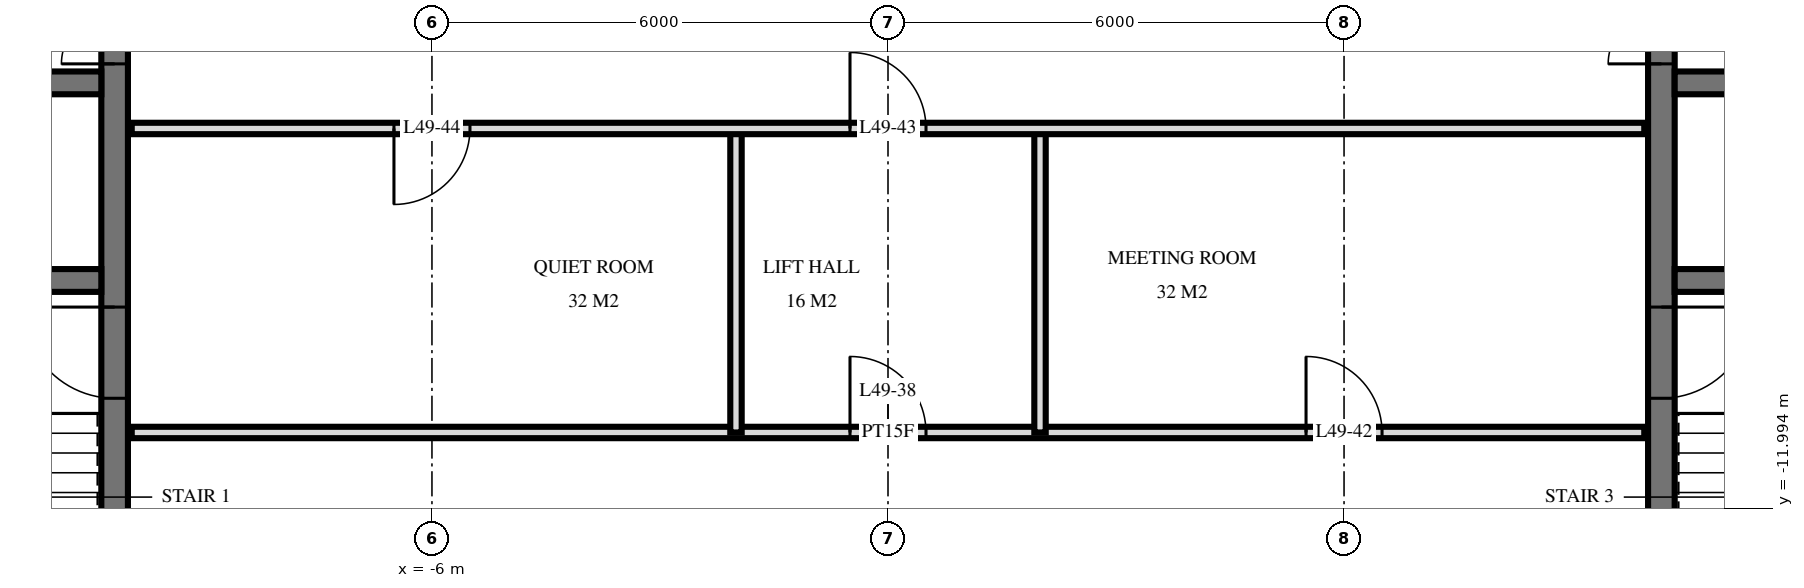
"""IFC4 building model, lengths in metres.
Left out: names, types, materials, properties, quantities, classifications, styles, units other than length and angle.
Written with IfcOpenShell. Run it as: python <this file> out.ifc"""

import sys

from ifc_helpers import new_model, si_unit, direction, frame, frame_2d, origin, place, context, subcontext, project, spatial, rectangle, extrude, element, fill, save


model = new_model("IFC4")
c1 = context("Model", 3, precision=1e-05, world=origin(), true_north=direction((0.0, 1.0)))
c2 = subcontext(c1, "Body", "Model", "MODEL_VIEW")
j1 = project(units=[si_unit("LENGTHUNIT", "METRE"), si_unit("PLANEANGLEUNIT", "RADIAN")], contexts=[c1])
p1 = place(None, origin())
s1 = spatial("IfcSite", under=j1, at=p1, CompositionType="ELEMENT")
p2 = place(p1, origin())
s2 = spatial("IfcBuilding", under=s1, at=p2, CompositionType="ELEMENT")
p3 = place(p2, frame((0.0, 0.0, 190.6)))
s3 = spatial("IfcBuildingStorey", under=s2, at=p3, CompositionType="ELEMENT", Elevation=190.6)
p4 = place(p3, frame((-10.175, -14.55, 0.0), z_axis=(0.0, 0.0, 1.0), x_axis=(0.0, 1.0, 0.0)))
e1 = element("IfcWall", 1, at=p4, inside=s3, PredefinedType="SHEAR", context=c2, shape_type="SweptSolid", body=[
    extrude(rectangle(XDim=14.1, YDim=0.35, at=frame_2d((7.05, 0.0))), origin(), (0.0, 0.0, 1.0), 3.5),
])
p5 = place(p4, frame((8.4, 0.0, 0.0)))
e2 = element("IfcOpeningElement", 2, at=p5, cuts=e1, PredefinedType="OPENING", context=c2, shape_type="SweptSolid", body=[
    extrude(rectangle(XDim=1.4, YDim=2.4, at=frame_2d((0.7, 1.2))), frame((0.0, 0.185, 0.0), z_axis=(0.0, -1.0, 0.0), x_axis=(1.0, 0.0, 0.0)), (0.0, 0.0, 1.0), 0.37),
])
p6 = place(p4, frame((10.0, 0.0, 0.0)))
e3 = element("IfcOpeningElement", 3, at=p6, cuts=e1, PredefinedType="OPENING", context=c2, shape_type="SweptSolid", body=[
    extrude(rectangle(XDim=1.4, YDim=2.4, at=frame_2d((0.7, 1.2))), frame((0.0, 0.185, 0.0), z_axis=(0.0, -1.0, 0.0), x_axis=(1.0, 0.0, 0.0)), (0.0, 0.0, 1.0), 0.37),
])
p7 = place(p4, frame((4.0, 0.0, 0.0)))
e4 = element("IfcOpeningElement", 4, at=p7, cuts=e1, PredefinedType="OPENING", context=c2, shape_type="SweptSolid", body=[
    extrude(rectangle(XDim=1.2, YDim=2.1, at=frame_2d((0.6, 1.05))), frame((0.0, 0.185, 0.0), z_axis=(0.0, -1.0, 0.0), x_axis=(1.0, 0.0, 0.0)), (0.0, 0.0, 1.0), 0.37),
])
p8 = place(p3, frame((-24.05, -6.4, 0.0), z_axis=(0.0, 0.0, 1.0), x_axis=(1.0, 0.0, 0.0)))
e5 = element("IfcWall", 5, at=p8, inside=s3, PredefinedType="SHEAR", context=c2, shape_type="SweptSolid", body=[
    extrude(rectangle(XDim=13.7, YDim=0.3, at=frame_2d((6.85, 0.0))), origin(), (0.0, 0.0, 1.0), 3.5),
])
p9 = place(p8, frame((0.55, 0.0, 0.0)))
e6 = element("IfcOpeningElement", 6, at=p9, cuts=e5, PredefinedType="OPENING", context=c2, shape_type="SweptSolid", body=[
    extrude(rectangle(XDim=1.1, YDim=2.1, at=frame_2d((0.55, 1.05))), frame((0.0, 0.16, 0.0), z_axis=(0.0, -1.0, 0.0), x_axis=(1.0, 0.0, 0.0)), (0.0, 0.0, 1.0), 0.32),
])
p10 = place(p8, frame((5.8, 0.0, 0.0)))
e7 = element("IfcOpeningElement", 7, at=p10, cuts=e5, PredefinedType="OPENING", context=c2, shape_type="SweptSolid", body=[
    extrude(rectangle(XDim=1.1, YDim=2.1, at=frame_2d((0.55, 1.05))), frame((0.0, 0.16, 0.0), z_axis=(0.0, -1.0, 0.0), x_axis=(1.0, 0.0, 0.0)), (0.0, 0.0, 1.0), 0.32),
])
p11 = place(p3, frame((-24.05, -9.0, 0.0), z_axis=(0.0, 0.0, 1.0), x_axis=(1.0, 0.0, 0.0)))
e8 = element("IfcWall", 8, at=p11, inside=s3, PredefinedType="SHEAR", context=c2, shape_type="SweptSolid", body=[
    extrude(rectangle(XDim=13.7, YDim=0.3, at=frame_2d((6.85, 0.0))), origin(), (0.0, 0.0, 1.0), 3.5),
])
p12 = place(p11, frame((8.8, 0.0, 0.0)))
e9 = element("IfcOpeningElement", 9, at=p12, cuts=e8, PredefinedType="OPENING", context=c2, shape_type="SweptSolid", body=[
    extrude(rectangle(XDim=1.1, YDim=2.1, at=frame_2d((0.55, 1.05))), frame((0.0, 0.16, 0.0), z_axis=(0.0, -1.0, 0.0), x_axis=(1.0, 0.0, 0.0)), (0.0, 0.0, 1.0), 0.32),
])
p13 = place(p3, frame((10.175, -14.55, 0.0), z_axis=(0.0, 0.0, 1.0), x_axis=(0.0, 1.0, 0.0)))
e10 = element("IfcWall", 10, at=p13, inside=s3, PredefinedType="SHEAR", context=c2, shape_type="SweptSolid", body=[
    extrude(rectangle(XDim=14.1, YDim=0.35, at=frame_2d((7.05, 0.0))), origin(), (0.0, 0.0, 1.0), 3.5),
])
p14 = place(p13, frame((8.4, 0.0, 0.0)))
e11 = element("IfcOpeningElement", 11, at=p14, cuts=e10, PredefinedType="OPENING", context=c2, shape_type="SweptSolid", body=[
    extrude(rectangle(XDim=1.4, YDim=2.4, at=frame_2d((0.7, 1.2))), frame((0.0, 0.185, 0.0), z_axis=(0.0, -1.0, 0.0), x_axis=(1.0, 0.0, 0.0)), (0.0, 0.0, 1.0), 0.37),
])
p15 = place(p13, frame((10.0, 0.0, 0.0)))
e12 = element("IfcOpeningElement", 12, at=p15, cuts=e10, PredefinedType="OPENING", context=c2, shape_type="SweptSolid", body=[
    extrude(rectangle(XDim=1.4, YDim=2.4, at=frame_2d((0.7, 1.2))), frame((0.0, 0.185, 0.0), z_axis=(0.0, -1.0, 0.0), x_axis=(1.0, 0.0, 0.0)), (0.0, 0.0, 1.0), 0.37),
])
p16 = place(p13, frame((4.0, 0.0, 0.0)))
e13 = element("IfcOpeningElement", 13, at=p16, cuts=e10, PredefinedType="OPENING", context=c2, shape_type="SweptSolid", body=[
    extrude(rectangle(XDim=1.2, YDim=2.1, at=frame_2d((0.6, 1.05))), frame((0.0, 0.185, 0.0), z_axis=(0.0, -1.0, 0.0), x_axis=(1.0, 0.0, 0.0)), (0.0, 0.0, 1.0), 0.37),
])
p17 = place(p3, frame((10.35, -6.4, 0.0), z_axis=(0.0, 0.0, 1.0), x_axis=(1.0, 0.0, 0.0)))
e14 = element("IfcWall", 14, at=p17, inside=s3, PredefinedType="SHEAR", context=c2, shape_type="SweptSolid", body=[
    extrude(rectangle(XDim=13.7, YDim=0.3, at=frame_2d((6.85, 0.0))), origin(), (0.0, 0.0, 1.0), 3.5),
])
p18 = place(p17, frame((12.05, 0.0, 0.0)))
e15 = element("IfcOpeningElement", 15, at=p18, cuts=e14, PredefinedType="OPENING", context=c2, shape_type="SweptSolid", body=[
    extrude(rectangle(XDim=1.1, YDim=2.1, at=frame_2d((0.55, 1.05))), frame((0.0, 0.16, 0.0), z_axis=(0.0, -1.0, 0.0), x_axis=(1.0, 0.0, 0.0)), (0.0, 0.0, 1.0), 0.32),
])
p19 = place(p17, frame((6.8, 0.0, 0.0)))
e16 = element("IfcOpeningElement", 16, at=p19, cuts=e14, PredefinedType="OPENING", context=c2, shape_type="SweptSolid", body=[
    extrude(rectangle(XDim=1.1, YDim=2.1, at=frame_2d((0.55, 1.05))), frame((0.0, 0.16, 0.0), z_axis=(0.0, -1.0, 0.0), x_axis=(1.0, 0.0, 0.0)), (0.0, 0.0, 1.0), 0.32),
])
p20 = place(p3, frame((10.35, -9.0, 0.0), z_axis=(0.0, 0.0, 1.0), x_axis=(1.0, 0.0, 0.0)))
e17 = element("IfcWall", 17, at=p20, inside=s3, PredefinedType="SHEAR", context=c2, shape_type="SweptSolid", body=[
    extrude(rectangle(XDim=13.7, YDim=0.3, at=frame_2d((6.85, 0.0))), origin(), (0.0, 0.0, 1.0), 3.5),
])
p21 = place(p20, frame((3.8, 0.0, 0.0)))
e18 = element("IfcOpeningElement", 18, at=p21, cuts=e17, PredefinedType="OPENING", context=c2, shape_type="SweptSolid", body=[
    extrude(rectangle(XDim=1.1, YDim=2.1, at=frame_2d((0.55, 1.05))), frame((0.0, 0.16, 0.0), z_axis=(0.0, -1.0, 0.0), x_axis=(1.0, 0.0, 0.0)), (0.0, 0.0, 1.0), 0.32),
])
for number, where, z_axis, x_axis in (
    (19, (2.0, -11.0, 0.0), (0.0, 0.0, 1.0), (0.0, 1.0, 0.0)),
    (20, (-2.0, -11.0, 0.0), (0.0, 0.0, 1.0), (0.0, 1.0, 0.0)),
):
    element("IfcWall", number, at=place(p3, frame(where, z_axis=z_axis, x_axis=x_axis)), inside=s3, PredefinedType="PARTITIONING", context=c2, shape_type="SweptSolid", body=[
        extrude(rectangle(XDim=4.0, YDim=0.15, at=frame_2d((2.0, 0.0))), origin(), (0.0, 0.0, 1.0), 3.22),
    ])
p22 = place(p3, frame((-9.95, -11.0, 0.0), z_axis=(0.0, 0.0, 1.0), x_axis=(1.0, 0.0, 0.0)))
e21 = element("IfcWall", 21, at=p22, inside=s3, PredefinedType="PARTITIONING", context=c2, shape_type="SweptSolid", body=[
    extrude(rectangle(XDim=19.9, YDim=0.15, at=frame_2d((9.95, 0.0))), origin(), (0.0, 0.0, 1.0), 3.22),
])
p23 = place(p22, frame((9.45, 0.0, 0.0)))
e22 = element("IfcOpeningElement", 22, at=p23, cuts=e21, PredefinedType="OPENING", context=c2, shape_type="SweptSolid", body=[
    extrude(rectangle(XDim=1.0, YDim=2.1, at=frame_2d((0.5, 1.05))), frame((0.0, 0.085, 0.0), z_axis=(0.0, -1.0, 0.0), x_axis=(1.0, 0.0, 0.0)), (0.0, 0.0, 1.0), 0.17),
])
p24 = place(p22, frame((15.45, 0.0, 0.0)))
e23 = element("IfcOpeningElement", 23, at=p24, cuts=e21, PredefinedType="OPENING", context=c2, shape_type="SweptSolid", body=[
    extrude(rectangle(XDim=1.0, YDim=2.1, at=frame_2d((0.5, 1.05))), frame((0.0, 0.085, 0.0), z_axis=(0.0, -1.0, 0.0), x_axis=(1.0, 0.0, 0.0)), (0.0, 0.0, 1.0), 0.17),
])
p25 = place(p3, frame((-9.95, -7.0, 0.0), z_axis=(0.0, 0.0, 1.0), x_axis=(1.0, 0.0, 0.0)))
e24 = element("IfcWall", 24, at=p25, inside=s3, PredefinedType="PARTITIONING", context=c2, shape_type="SweptSolid", body=[
    extrude(rectangle(XDim=19.9, YDim=0.15, at=frame_2d((9.95, 0.0))), origin(), (0.0, 0.0, 1.0), 3.22),
])
p26 = place(p25, frame((9.45, 0.0, 0.0)))
e25 = element("IfcOpeningElement", 25, at=p26, cuts=e24, PredefinedType="OPENING", context=c2, shape_type="SweptSolid", body=[
    extrude(rectangle(XDim=1.0, YDim=2.1, at=frame_2d((0.5, 1.05))), frame((0.0, 0.085, 0.0), z_axis=(0.0, -1.0, 0.0), x_axis=(1.0, 0.0, 0.0)), (0.0, 0.0, 1.0), 0.17),
])
p27 = place(p25, frame((3.45, 0.0, 0.0)))
e26 = element("IfcOpeningElement", 26, at=p27, cuts=e24, PredefinedType="OPENING", context=c2, shape_type="SweptSolid", body=[
    extrude(rectangle(XDim=1.0, YDim=2.1, at=frame_2d((0.5, 1.05))), frame((0.0, 0.085, 0.0), z_axis=(0.0, -1.0, 0.0), x_axis=(1.0, 0.0, 0.0)), (0.0, 0.0, 1.0), 0.17),
])
p28 = place(p5, origin())
e27 = element("IfcDoor", 27, at=p28, inside=s3, OperationType="DOUBLE_DOOR_SINGLE_SWING", PredefinedType="DOOR", context=c2, shape_type="SweptSolid", body=[
    extrude(rectangle(XDim=1.4, YDim=2.4, at=frame_2d((0.7, 1.2))), frame((0.0, 0.025, 0.0), z_axis=(0.0, -1.0, 0.0), x_axis=(1.0, 0.0, 0.0)), (0.0, 0.0, 1.0), 0.05),
])
fill(e2, e27)
p29 = place(p7, origin())
e28 = element("IfcDoor", 28, at=p29, inside=s3, OperationType="SINGLE_SWING_LEFT", PredefinedType="DOOR", context=c2, shape_type="SweptSolid", body=[
    extrude(rectangle(XDim=1.2, YDim=2.1, at=frame_2d((0.6, 1.05))), frame((0.0, 0.025, 0.0), z_axis=(0.0, -1.0, 0.0), x_axis=(1.0, 0.0, 0.0)), (0.0, 0.0, 1.0), 0.05),
])
fill(e4, e28)
p30 = place(p14, origin())
e29 = element("IfcDoor", 29, at=p30, inside=s3, OperationType="DOUBLE_DOOR_SINGLE_SWING", PredefinedType="DOOR", context=c2, shape_type="SweptSolid", body=[
    extrude(rectangle(XDim=1.4, YDim=2.4, at=frame_2d((0.7, 1.2))), frame((0.0, 0.025, 0.0), z_axis=(0.0, -1.0, 0.0), x_axis=(1.0, 0.0, 0.0)), (0.0, 0.0, 1.0), 0.05),
])
fill(e11, e29)
p31 = place(p16, frame((0.6, 0.0, 0.0), z_axis=(0.0, 0.0, 1.0), x_axis=(-1.0, 0.0, 0.0)))
e30 = element("IfcDoor", 30, at=p31, inside=s3, OperationType="SINGLE_SWING_RIGHT", PredefinedType="DOOR", context=c2, shape_type="SweptSolid", body=[
    extrude(rectangle(XDim=1.2, YDim=2.1, at=frame_2d((0.0, 1.05))), frame((0.0, -0.025, 0.0), z_axis=(0.0, 1.0, 0.0), x_axis=(-1.0, 0.0, 0.0)), (0.0, 0.0, 1.0), 0.05),
])
fill(e13, e30)
p32 = place(p23, origin())
e31 = element("IfcDoor", 31, at=p32, inside=s3, OperationType="SINGLE_SWING_RIGHT", PredefinedType="DOOR", context=c2, shape_type="SweptSolid", body=[
    extrude(rectangle(XDim=1.0, YDim=2.1, at=frame_2d((0.5, 1.05))), frame((0.0, 0.025, 0.0), z_axis=(0.0, -1.0, 0.0), x_axis=(1.0, 0.0, 0.0)), (0.0, 0.0, 1.0), 0.05),
])
fill(e22, e31)
p33 = place(p24, origin())
e32 = element("IfcDoor", 32, at=p33, inside=s3, OperationType="SINGLE_SWING_RIGHT", PredefinedType="DOOR", context=c2, shape_type="SweptSolid", body=[
    extrude(rectangle(XDim=1.0, YDim=2.1, at=frame_2d((0.5, 1.05))), frame((0.0, 0.025, 0.0), z_axis=(0.0, -1.0, 0.0), x_axis=(1.0, 0.0, 0.0)), (0.0, 0.0, 1.0), 0.05),
])
fill(e23, e32)
p34 = place(p26, origin())
e33 = element("IfcDoor", 33, at=p34, inside=s3, OperationType="SINGLE_SWING_RIGHT", PredefinedType="DOOR", context=c2, shape_type="SweptSolid", body=[
    extrude(rectangle(XDim=1.0, YDim=2.1, at=frame_2d((0.5, 1.05))), frame((0.0, 0.025, 0.0), z_axis=(0.0, -1.0, 0.0), x_axis=(1.0, 0.0, 0.0)), (0.0, 0.0, 1.0), 0.05),
])
fill(e25, e33)
p35 = place(p27, frame((0.5, 0.0, 0.0), z_axis=(0.0, 0.0, 1.0), x_axis=(-1.0, 0.0, 0.0)))
e34 = element("IfcDoor", 34, at=p35, inside=s3, OperationType="SINGLE_SWING_LEFT", PredefinedType="DOOR", context=c2, shape_type="SweptSolid", body=[
    extrude(rectangle(XDim=1.0, YDim=2.1, at=frame_2d((0.0, 1.05))), frame((0.0, -0.025, 0.0), z_axis=(0.0, 1.0, 0.0), x_axis=(-1.0, 0.0, 0.0)), (0.0, 0.0, 1.0), 0.05),
])
fill(e26, e34)
save(model, sys.argv[1])
